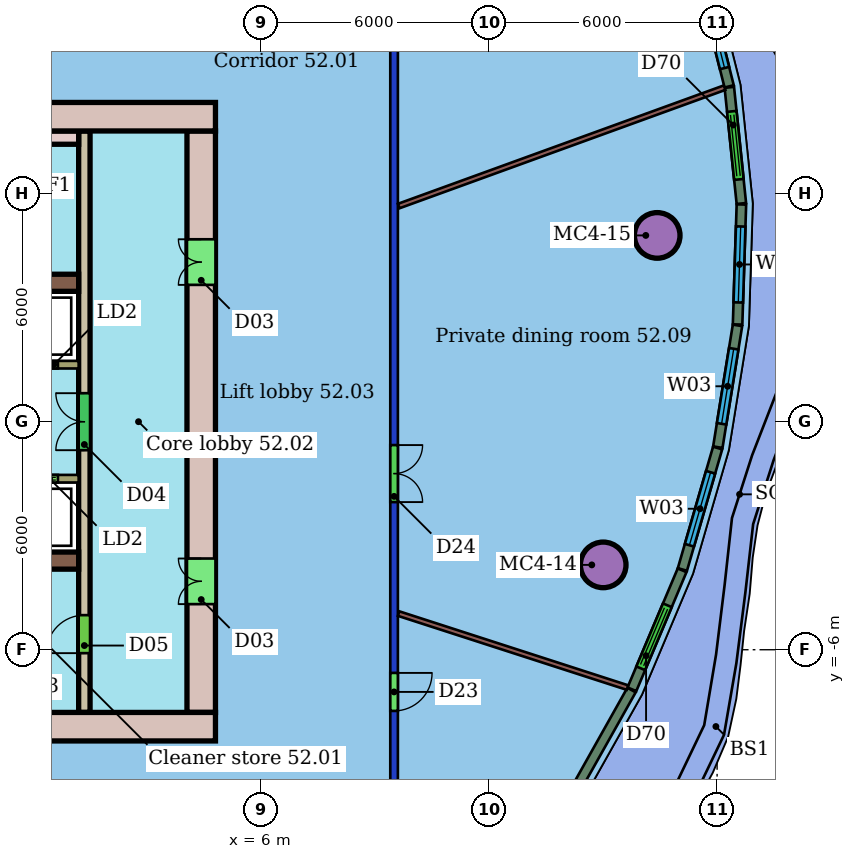
"""IFC4 building model, lengths in metres.
Left out: names, types, materials, properties, quantities, classifications, styles, units other than length and angle.
Written with IfcOpenShell. Run it as: python <this file> out.ifc"""

import sys

from ifc_helpers import new_model, si_unit, direction, frame, frame_2d, origin, origin_2d, place, context, subcontext, project, spatial, rectangle, hollow_circle, extrude, element, fill, save


model = new_model("IFC4")
c1 = context("Model", 3, precision=1e-05, world=origin(), true_north=direction((0.0, 1.0)))
c2 = subcontext(c1, "Body", "Model", "MODEL_VIEW")
j1 = project(units=[si_unit("LENGTHUNIT", "METRE"), si_unit("PLANEANGLEUNIT", "RADIAN")], contexts=[c1])
p1 = place(None, origin())
s1 = spatial("IfcSite", under=j1, at=p1, CompositionType="ELEMENT")
p2 = place(p1, origin())
s2 = spatial("IfcBuilding", under=s1, at=p2, CompositionType="ELEMENT")
p3 = place(p2, frame((0.0, 0.0, 213.7)))
s3 = spatial("IfcBuildingStorey", under=s2, at=p3, CompositionType="ELEMENT", Elevation=213.7)
for number, where, z_axis, x_axis in (
    (1, (15.003, -3.768, 0.0), (0.0, 0.0, 1.0), (1.0, 0.0, 0.0)),
    (2, (16.424, 4.901, 0.0), (0.0, 0.0, 1.0), (1.0, 0.0, 0.0)),
):
    element("IfcColumn", number, at=place(p3, frame(where, z_axis=z_axis, x_axis=x_axis)), inside=s3, PredefinedType="COLUMN", context=c2, shape_type="SweptSolid", body=[
        extrude(hollow_circle(Radius=0.6, WallThickness=0.045, at=origin_2d()), origin(), (0.0, 0.0, 1.0), 3.45),
    ])
p4 = place(p3, frame((9.5, 10.4, 0.0), z_axis=(0.0, 0.0, 1.0), x_axis=(0.0, -1.0, 0.0)))
e3 = element("IfcWall", 3, at=p4, inside=s3, PredefinedType="PARTITIONING", context=c2, shape_type="SweptSolid", body=[
    extrude(rectangle(XDim=20.8, YDim=0.2, at=frame_2d((10.4, 0.0))), origin(), (0.0, 0.0, 1.0), 3.05),
])
p5 = place(p4, frame((17.01, 0.0, 0.0)))
e4 = element("IfcOpeningElement", 4, at=p5, cuts=e3, PredefinedType="OPENING", context=c2, shape_type="SweptSolid", body=[
    extrude(rectangle(XDim=1.0, YDim=2.4, at=frame_2d((0.5, 1.2))), frame((0.0, 0.11, 0.0), z_axis=(0.0, -1.0, 0.0), x_axis=(1.0, 0.0, 0.0)), (0.0, 0.0, 1.0), 0.22),
])
p6 = place(p4, frame((11.015, 0.0, 0.0)))
e5 = element("IfcOpeningElement", 5, at=p6, cuts=e3, PredefinedType="OPENING", context=c2, shape_type="SweptSolid", body=[
    extrude(rectangle(XDim=1.5, YDim=2.1, at=frame_2d((0.75, 1.05))), frame((0.0, 0.11, 0.0), z_axis=(0.0, -1.0, 0.0), x_axis=(1.0, 0.0, 0.0)), (0.0, 0.0, 1.0), 0.22),
])
p7 = place(p3, frame((15.642, -6.996, 0.0), z_axis=(0.0, 0.0, 1.0), x_axis=(-0.951521574536, 0.307582010514, 0.0)))
e6 = element("IfcWall", 6, at=p7, inside=s3, PredefinedType="PARTITIONING", context=c2, shape_type="SweptSolid", body=[
    extrude(rectangle(XDim=6.329, YDim=0.125, at=frame_2d((3.165, 0.0))), origin(), (0.0, 0.0, 1.0), 3.45),
])
p8 = place(p3, frame((18.197, 8.789, 0.0), z_axis=(0.0, 0.0, 1.0), x_axis=(-0.939914460754, -0.341410026896, 0.0)))
e7 = element("IfcWall", 7, at=p8, inside=s3, PredefinedType="PARTITIONING", context=c2, shape_type="SweptSolid", body=[
    extrude(rectangle(XDim=9.124, YDim=0.125, at=frame_2d((4.562, 0.0))), origin(), (0.0, 0.0, 1.0), 3.45),
])
p9 = place(p3, frame((14.077, -10.035, 0.0), z_axis=(0.0, 0.0, 1.0), x_axis=(0.489914644591, 0.871770406136, 0.0)))
e8 = element("IfcWall", 8, at=p9, inside=s3, PredefinedType="SOLIDWALL", context=c2, shape_type="SweptSolid", body=[
    extrude(rectangle(XDim=3.412, YDim=0.25, at=frame_2d((1.706, 0.0))), origin(), (0.0, 0.0, 1.0), 3.1),
])
p10 = place(p3, frame((15.758, -7.041, 0.0), z_axis=(0.0, 0.0, 1.0), x_axis=(0.388763390527, 0.921337628769, 0.0)))
e9 = element("IfcWall", 9, at=p10, inside=s3, PredefinedType="SOLIDWALL", context=c2, shape_type="SweptSolid", body=[
    extrude(rectangle(XDim=3.399, YDim=0.25, at=frame_2d((1.699, 0.0))), origin(), (0.0, 0.0, 1.0), 3.1),
])
p11 = place(p10, frame((0.599, 0.0, 0.0)))
e10 = element("IfcOpeningElement", 10, at=p11, cuts=e9, PredefinedType="OPENING", context=c2, shape_type="SweptSolid", body=[
    extrude(rectangle(XDim=1.8, YDim=2.4, at=frame_2d((0.9, 1.2))), frame((0.0, 0.135, 0.0), z_axis=(0.0, -1.0, 0.0), x_axis=(1.0, 0.0, 0.0)), (0.0, 0.0, 1.0), 0.27),
])
p12 = place(p3, frame((17.087, -3.888, 0.0), z_axis=(0.0, 0.0, 1.0), x_axis=(0.278604991916, 0.960405778033, 0.0)))
e11 = element("IfcWall", 11, at=p12, inside=s3, PredefinedType="SOLIDWALL", context=c2, shape_type="SweptSolid", body=[
    extrude(rectangle(XDim=3.327, YDim=0.25, at=frame_2d((1.664, 0.0))), origin(), (0.0, 0.0, 1.0), 3.1),
])
p13 = place(p12, frame((0.664, 0.0, 0.9)))
e12 = element("IfcOpeningElement", 12, at=p13, cuts=e11, PredefinedType="OPENING", context=c2, shape_type="SweptSolid", body=[
    extrude(rectangle(XDim=2.0, YDim=2.1, at=frame_2d((1.0, 1.05))), frame((0.0, 0.135, 0.0), z_axis=(0.0, -1.0, 0.0), x_axis=(1.0, 0.0, 0.0)), (0.0, 0.0, 1.0), 0.27),
])
p14 = place(p3, frame((18.019, -0.67, 0.0), z_axis=(0.0, 0.0, 1.0), x_axis=(0.159457089841, 0.987204860452, 0.0)))
e13 = element("IfcWall", 13, at=p14, inside=s3, PredefinedType="SOLIDWALL", context=c2, shape_type="SweptSolid", body=[
    extrude(rectangle(XDim=3.246, YDim=0.25, at=frame_2d((1.623, 0.0))), origin(), (0.0, 0.0, 1.0), 3.1),
])
p15 = place(p14, frame((0.623, 0.0, 0.9)))
e14 = element("IfcOpeningElement", 14, at=p15, cuts=e13, PredefinedType="OPENING", context=c2, shape_type="SweptSolid", body=[
    extrude(rectangle(XDim=2.0, YDim=2.1, at=frame_2d((1.0, 1.05))), frame((0.0, 0.135, 0.0), z_axis=(0.0, -1.0, 0.0), x_axis=(1.0, 0.0, 0.0)), (0.0, 0.0, 1.0), 0.27),
])
p16 = place(p3, frame((18.539, 2.558, 0.0), z_axis=(0.0, 0.0, 1.0), x_axis=(0.031760681262, 0.999495502304, 0.0)))
e15 = element("IfcWall", 15, at=p16, inside=s3, PredefinedType="SOLIDWALL", context=c2, shape_type="SweptSolid", body=[
    extrude(rectangle(XDim=3.159, YDim=0.25, at=frame_2d((1.58, 0.0))), origin(), (0.0, 0.0, 1.0), 3.1),
])
p17 = place(p16, frame((0.58, 0.0, 0.9)))
e16 = element("IfcOpeningElement", 16, at=p17, cuts=e15, PredefinedType="OPENING", context=c2, shape_type="SweptSolid", body=[
    extrude(rectangle(XDim=2.0, YDim=2.1, at=frame_2d((1.0, 1.05))), frame((0.0, 0.135, 0.0), z_axis=(0.0, -1.0, 0.0), x_axis=(1.0, 0.0, 0.0)), (0.0, 0.0, 1.0), 0.27),
])
p18 = place(p3, frame((18.639, 5.741, 0.0), z_axis=(0.0, 0.0, 1.0), x_axis=(-0.10327045025, 0.994653313524, 0.0)))
e17 = element("IfcWall", 17, at=p18, inside=s3, PredefinedType="SOLIDWALL", context=c2, shape_type="SweptSolid", body=[
    extrude(rectangle(XDim=3.073, YDim=0.25, at=frame_2d((1.537, 0.0))), origin(), (0.0, 0.0, 1.0), 3.1),
])
p19 = place(p18, frame((0.637, 0.0, 0.0)))
e18 = element("IfcOpeningElement", 18, at=p19, cuts=e17, PredefinedType="OPENING", context=c2, shape_type="SweptSolid", body=[
    extrude(rectangle(XDim=1.8, YDim=2.4, at=frame_2d((0.9, 1.2))), frame((0.0, 0.135, 0.0), z_axis=(0.0, -1.0, 0.0), x_axis=(1.0, 0.0, 0.0)), (0.0, 0.0, 1.0), 0.27),
])
p20 = place(p3, frame((18.317, 8.823, 0.0), z_axis=(0.0, 0.0, 1.0), x_axis=(-0.243245471753, 0.96996476249, 0.0)))
e19 = element("IfcWall", 19, at=p20, inside=s3, PredefinedType="SOLIDWALL", context=c2, shape_type="SweptSolid", body=[
    extrude(rectangle(XDim=2.994, YDim=0.25, at=frame_2d((1.497, 0.0))), origin(), (0.0, 0.0, 1.0), 3.1),
])
p21 = place(p20, frame((0.497, 0.0, 0.9)))
e20 = element("IfcOpeningElement", 20, at=p21, cuts=e19, PredefinedType="OPENING", context=c2, shape_type="SweptSolid", body=[
    extrude(rectangle(XDim=2.0, YDim=2.1, at=frame_2d((1.0, 1.05))), frame((0.0, 0.135, 0.0), z_axis=(0.0, -1.0, 0.0), x_axis=(1.0, 0.0, 0.0)), (0.0, 0.0, 1.0), 0.27),
])
p22 = place(p3, frame((4.8, 8.025, 0.0), z_axis=(0.0, 0.0, 1.0), x_axis=(-1.0, 0.0, 0.0)))
e21 = element("IfcWall", 21, at=p22, inside=s3, PredefinedType="SHEAR", context=c2, shape_type="SweptSolid", body=[
    extrude(rectangle(XDim=10.8, YDim=0.75, at=frame_2d((5.4, 0.0))), origin(), (0.0, 0.0, 1.0), 3.3),
])
p23 = place(p22, frame((4.4, 0.0, 0.0)))
e22 = element("IfcOpeningElement", 22, at=p23, cuts=e21, PredefinedType="OPENING", context=c2, shape_type="SweptSolid", body=[
    extrude(rectangle(XDim=1.2, YDim=2.1, at=frame_2d((0.6, 1.05))), frame((0.0, 0.385, 0.0), z_axis=(0.0, -1.0, 0.0), x_axis=(1.0, 0.0, 0.0)), (0.0, 0.0, 1.0), 0.77),
])
p24 = place(p3, frame((-16.8, -8.025, 0.0), z_axis=(0.0, 0.0, 1.0), x_axis=(1.0, 0.0, 0.0)))
e23 = element("IfcWall", 23, at=p24, inside=s3, PredefinedType="SHEAR", context=c2, shape_type="SweptSolid", body=[
    extrude(rectangle(XDim=21.6, YDim=0.75, at=frame_2d((10.8, 0.0))), origin(), (0.0, 0.0, 1.0), 3.3),
])
p25 = place(p24, frame((4.8, 0.0, 0.0)))
e24 = element("IfcOpeningElement", 24, at=p25, cuts=e23, PredefinedType="OPENING", context=c2, shape_type="SweptSolid", body=[
    extrude(rectangle(XDim=1.2, YDim=2.1, at=frame_2d((0.6, 1.05))), frame((0.0, 0.385, 0.0), z_axis=(0.0, -1.0, 0.0), x_axis=(1.0, 0.0, 0.0)), (0.0, 0.0, 1.0), 0.77),
])
p26 = place(p3, frame((4.425, -7.65, 0.0), z_axis=(0.0, 0.0, 1.0), x_axis=(0.0, 1.0, 0.0)))
e25 = element("IfcWall", 25, at=p26, inside=s3, PredefinedType="SHEAR", context=c2, shape_type="SweptSolid", body=[
    extrude(rectangle(XDim=15.3, YDim=0.75, at=frame_2d((7.65, 0.0))), origin(), (0.0, 0.0, 1.0), 3.3),
])
p27 = place(p26, frame((2.85, 0.0, 0.0)))
e26 = element("IfcOpeningElement", 26, at=p27, cuts=e25, PredefinedType="OPENING", context=c2, shape_type="SweptSolid", body=[
    extrude(rectangle(XDim=1.2, YDim=2.1, at=frame_2d((0.6, 1.05))), frame((0.0, 0.385, 0.0), z_axis=(0.0, -1.0, 0.0), x_axis=(1.0, 0.0, 0.0)), (0.0, 0.0, 1.0), 0.77),
])
p28 = place(p26, frame((11.25, 0.0, 0.0)))
e27 = element("IfcOpeningElement", 27, at=p28, cuts=e25, PredefinedType="OPENING", context=c2, shape_type="SweptSolid", body=[
    extrude(rectangle(XDim=1.2, YDim=2.1, at=frame_2d((0.6, 1.05))), frame((0.0, 0.385, 0.0), z_axis=(0.0, -1.0, 0.0), x_axis=(1.0, 0.0, 0.0)), (0.0, 0.0, 1.0), 0.77),
])
for number, where, z_axis, x_axis in (
    (28, (-6.0, 3.655, 0.0), (0.0, 0.0, 1.0), (1.0, 0.0, 0.0)),
    (29, (-6.0, -3.655, 0.0), (0.0, 0.0, 1.0), (1.0, 0.0, 0.0)),
):
    element("IfcWall", number, at=place(p3, frame(where, z_axis=z_axis, x_axis=x_axis)), inside=s3, PredefinedType="SHEAR", context=c2, shape_type="SweptSolid", body=[
        extrude(rectangle(XDim=7.2, YDim=0.45, at=frame_2d((3.6, 0.0))), origin(), (0.0, 0.0, 1.0), 3.3),
    ])
p29 = place(p3, frame((1.35, -7.65, 0.0), z_axis=(0.0, 0.0, 1.0), x_axis=(0.0, 1.0, 0.0)))
e30 = element("IfcWall", 30, at=p29, inside=s3, PredefinedType="SHEAR", context=c2, shape_type="SweptSolid", body=[
    extrude(rectangle(XDim=15.3, YDim=0.3, at=frame_2d((7.65, 0.0))), origin(), (0.0, 0.0, 1.0), 3.3),
])
p30 = place(p29, frame((1.56, 0.0, 0.0)))
e31 = element("IfcOpeningElement", 31, at=p30, cuts=e30, PredefinedType="OPENING", context=c2, shape_type="SweptSolid", body=[
    extrude(rectangle(XDim=1.0, YDim=2.1, at=frame_2d((0.5, 1.05))), frame((0.0, 0.16, 0.0), z_axis=(0.0, -1.0, 0.0), x_axis=(1.0, 0.0, 0.0)), (0.0, 0.0, 1.0), 0.32),
])
p31 = place(p29, frame((6.9, 0.0, 0.0)))
e32 = element("IfcOpeningElement", 32, at=p31, cuts=e30, PredefinedType="OPENING", context=c2, shape_type="SweptSolid", body=[
    extrude(rectangle(XDim=1.5, YDim=2.1, at=frame_2d((0.75, 1.05))), frame((0.0, 0.16, 0.0), z_axis=(0.0, -1.0, 0.0), x_axis=(1.0, 0.0, 0.0)), (0.0, 0.0, 1.0), 0.32),
])
p32 = place(p3, frame((-13.2, 1.5, 0.0), z_axis=(0.0, 0.0, 1.0), x_axis=(1.0, 0.0, 0.0)))
e33 = element("IfcWall", 33, at=p32, inside=s3, PredefinedType="SHEAR", context=c2, shape_type="SweptSolid", body=[
    extrude(rectangle(XDim=14.4, YDim=0.2, at=frame_2d((7.2, 0.0))), origin(), (0.0, 0.0, 1.0), 3.3),
])
p33 = place(p32, frame((10.312, 0.0, 0.0)))
e34 = element("IfcOpeningElement", 34, at=p33, cuts=e33, PredefinedType="OPENING", context=c2, shape_type="SweptSolid", body=[
    extrude(rectangle(XDim=1.1, YDim=2.1, at=frame_2d((0.55, 1.05))), frame((0.0, 0.11, 0.0), z_axis=(0.0, -1.0, 0.0), x_axis=(1.0, 0.0, 0.0)), (0.0, 0.0, 1.0), 0.22),
])
p34 = place(p32, frame((12.754, 0.0, 0.0)))
e35 = element("IfcOpeningElement", 35, at=p34, cuts=e33, PredefinedType="OPENING", context=c2, shape_type="SweptSolid", body=[
    extrude(rectangle(XDim=1.1, YDim=2.1, at=frame_2d((0.55, 1.05))), frame((0.0, 0.11, 0.0), z_axis=(0.0, -1.0, 0.0), x_axis=(1.0, 0.0, 0.0)), (0.0, 0.0, 1.0), 0.22),
])
p35 = place(p32, frame((0.15, 0.0, 0.0)))
e36 = element("IfcOpeningElement", 36, at=p35, cuts=e33, PredefinedType="OPENING", context=c2, shape_type="SweptSolid", body=[
    extrude(rectangle(XDim=1.0, YDim=2.1, at=frame_2d((0.5, 1.05))), frame((0.0, 0.11, 0.0), z_axis=(0.0, -1.0, 0.0), x_axis=(1.0, 0.0, 0.0)), (0.0, 0.0, 1.0), 0.22),
])
p36 = place(p32, frame((2.794, 0.0, 0.0)))
e37 = element("IfcOpeningElement", 37, at=p36, cuts=e33, PredefinedType="OPENING", context=c2, shape_type="SweptSolid", body=[
    extrude(rectangle(XDim=0.9, YDim=2.1, at=frame_2d((0.45, 1.05))), frame((0.0, 0.11, 0.0), z_axis=(0.0, -1.0, 0.0), x_axis=(1.0, 0.0, 0.0)), (0.0, 0.0, 1.0), 0.22),
])
p37 = place(p32, frame((8.467, 0.0, 0.0)))
e38 = element("IfcOpeningElement", 38, at=p37, cuts=e33, PredefinedType="OPENING", context=c2, shape_type="SweptSolid", body=[
    extrude(rectangle(XDim=0.9, YDim=2.1, at=frame_2d((0.45, 1.05))), frame((0.0, 0.11, 0.0), z_axis=(0.0, -1.0, 0.0), x_axis=(1.0, 0.0, 0.0)), (0.0, 0.0, 1.0), 0.22),
])
p38 = place(p3, frame((1.2, -1.5, 0.0), z_axis=(0.0, 0.0, 1.0), x_axis=(-1.0, 0.0, 0.0)))
e39 = element("IfcWall", 39, at=p38, inside=s3, PredefinedType="SHEAR", context=c2, shape_type="SweptSolid", body=[
    extrude(rectangle(XDim=14.4, YDim=0.2, at=frame_2d((7.2, 0.0))), origin(), (0.0, 0.0, 1.0), 3.3),
])
p39 = place(p38, frame((7.821, 0.0, 0.0)))
e40 = element("IfcOpeningElement", 40, at=p39, cuts=e39, PredefinedType="OPENING", context=c2, shape_type="SweptSolid", body=[
    extrude(rectangle(XDim=1.2, YDim=2.1, at=frame_2d((0.6, 1.05))), frame((0.0, 0.11, 0.0), z_axis=(0.0, -1.0, 0.0), x_axis=(1.0, 0.0, 0.0)), (0.0, 0.0, 1.0), 0.22),
])
p40 = place(p38, frame((0.546, 0.0, 0.0)))
e41 = element("IfcOpeningElement", 41, at=p40, cuts=e39, PredefinedType="OPENING", context=c2, shape_type="SweptSolid", body=[
    extrude(rectangle(XDim=1.1, YDim=2.1, at=frame_2d((0.55, 1.05))), frame((0.0, 0.11, 0.0), z_axis=(0.0, -1.0, 0.0), x_axis=(1.0, 0.0, 0.0)), (0.0, 0.0, 1.0), 0.22),
])
p41 = place(p38, frame((4.983, 0.0, 0.0)))
e42 = element("IfcOpeningElement", 42, at=p41, cuts=e39, PredefinedType="OPENING", context=c2, shape_type="SweptSolid", body=[
    extrude(rectangle(XDim=1.0, YDim=2.1, at=frame_2d((0.5, 1.05))), frame((0.0, 0.11, 0.0), z_axis=(0.0, -1.0, 0.0), x_axis=(1.0, 0.0, 0.0)), (0.0, 0.0, 1.0), 0.22),
])
p42 = place(p38, frame((2.592, 0.0, 0.0)))
e43 = element("IfcOpeningElement", 43, at=p42, cuts=e39, PredefinedType="OPENING", context=c2, shape_type="SweptSolid", body=[
    extrude(rectangle(XDim=1.0, YDim=2.1, at=frame_2d((0.5, 1.05))), frame((0.0, 0.11, 0.0), z_axis=(0.0, -1.0, 0.0), x_axis=(1.0, 0.0, 0.0)), (0.0, 0.0, 1.0), 0.22),
])
p43 = place(p3, frame((0.4, 7.475, 0.0), z_axis=(0.0, 0.0, 1.0), x_axis=(1.0, 0.0, 0.0)))
e44 = element("IfcWall", 44, at=p43, inside=s3, PredefinedType="SHEAR", context=c2, shape_type="SweptSolid", body=[
    extrude(rectangle(XDim=0.8, YDim=0.35, at=frame_2d((0.4, 0.0))), origin(), (0.0, 0.0, 1.0), 3.3),
])
p44 = place(p5, origin())
e45 = element("IfcDoor", 45, at=p44, inside=s3, OperationType="SINGLE_SWING_LEFT", PredefinedType="DOOR", context=c2, shape_type="SweptSolid", body=[
    extrude(rectangle(XDim=1.0, YDim=2.4, at=frame_2d((0.5, 1.2))), frame((0.0, 0.025, 0.0), z_axis=(0.0, -1.0, 0.0), x_axis=(1.0, 0.0, 0.0)), (0.0, 0.0, 1.0), 0.05),
])
fill(e4, e45)
p45 = place(p6, origin())
e46 = element("IfcDoor", 46, at=p45, inside=s3, OperationType="DOUBLE_DOOR_SINGLE_SWING", PredefinedType="DOOR", context=c2, shape_type="SweptSolid", body=[
    extrude(rectangle(XDim=1.5, YDim=2.1, at=frame_2d((0.75, 1.05))), frame((0.0, 0.025, 0.0), z_axis=(0.0, -1.0, 0.0), x_axis=(1.0, 0.0, 0.0)), (0.0, 0.0, 1.0), 0.05),
])
fill(e5, e46)
p46 = place(p11, origin())
e47 = element("IfcDoor", 47, at=p46, inside=s3, OperationType="DOUBLE_DOOR_SLIDING", PredefinedType="DOOR", context=c2, shape_type="SweptSolid", body=[
    extrude(rectangle(XDim=1.8, YDim=2.4, at=frame_2d((0.9, 1.2))), frame((0.0, 0.025, 0.0), z_axis=(0.0, -1.0, 0.0), x_axis=(1.0, 0.0, 0.0)), (0.0, 0.0, 1.0), 0.05),
])
fill(e10, e47)
p47 = place(p13, origin())
e48 = element("IfcWindow", 48, at=p47, inside=s3, PartitioningType="SINGLE_PANEL", PredefinedType="WINDOW", context=c2, shape_type="SweptSolid", body=[
    extrude(rectangle(XDim=2.0, YDim=2.1, at=frame_2d((1.0, 1.05))), frame((0.0, 0.03, 0.0), z_axis=(0.0, -1.0, 0.0), x_axis=(1.0, 0.0, 0.0)), (0.0, 0.0, 1.0), 0.06),
])
fill(e12, e48)
p48 = place(p15, origin())
e49 = element("IfcWindow", 49, at=p48, inside=s3, PartitioningType="SINGLE_PANEL", PredefinedType="WINDOW", context=c2, shape_type="SweptSolid", body=[
    extrude(rectangle(XDim=2.0, YDim=2.1, at=frame_2d((1.0, 1.05))), frame((0.0, 0.03, 0.0), z_axis=(0.0, -1.0, 0.0), x_axis=(1.0, 0.0, 0.0)), (0.0, 0.0, 1.0), 0.06),
])
fill(e14, e49)
p49 = place(p17, origin())
e50 = element("IfcWindow", 50, at=p49, inside=s3, PartitioningType="SINGLE_PANEL", PredefinedType="WINDOW", context=c2, shape_type="SweptSolid", body=[
    extrude(rectangle(XDim=2.0, YDim=2.1, at=frame_2d((1.0, 1.05))), frame((0.0, 0.03, 0.0), z_axis=(0.0, -1.0, 0.0), x_axis=(1.0, 0.0, 0.0)), (0.0, 0.0, 1.0), 0.06),
])
fill(e16, e50)
p50 = place(p19, origin())
e51 = element("IfcDoor", 51, at=p50, inside=s3, OperationType="DOUBLE_DOOR_SLIDING", PredefinedType="DOOR", context=c2, shape_type="SweptSolid", body=[
    extrude(rectangle(XDim=1.8, YDim=2.4, at=frame_2d((0.9, 1.2))), frame((0.0, 0.025, 0.0), z_axis=(0.0, -1.0, 0.0), x_axis=(1.0, 0.0, 0.0)), (0.0, 0.0, 1.0), 0.05),
])
fill(e18, e51)
p51 = place(p21, origin())
e52 = element("IfcWindow", 52, at=p51, inside=s3, PartitioningType="SINGLE_PANEL", PredefinedType="WINDOW", context=c2, shape_type="SweptSolid", body=[
    extrude(rectangle(XDim=2.0, YDim=2.1, at=frame_2d((1.0, 1.05))), frame((0.0, 0.03, 0.0), z_axis=(0.0, -1.0, 0.0), x_axis=(1.0, 0.0, 0.0)), (0.0, 0.0, 1.0), 0.06),
])
fill(e20, e52)
p52 = place(p27, origin())
e53 = element("IfcDoor", 53, at=p52, inside=s3, OperationType="DOUBLE_DOOR_SINGLE_SWING", PredefinedType="NOTDEFINED", context=c2, shape_type="SweptSolid", body=[
    extrude(rectangle(XDim=1.2, YDim=2.1, at=frame_2d((0.6, 1.05))), frame((0.0, 0.025, 0.0), z_axis=(0.0, -1.0, 0.0), x_axis=(1.0, 0.0, 0.0)), (0.0, 0.0, 1.0), 0.05),
])
fill(e26, e53)
p53 = place(p28, origin())
e54 = element("IfcDoor", 54, at=p53, inside=s3, OperationType="DOUBLE_DOOR_SINGLE_SWING", PredefinedType="NOTDEFINED", context=c2, shape_type="SweptSolid", body=[
    extrude(rectangle(XDim=1.2, YDim=2.1, at=frame_2d((0.6, 1.05))), frame((0.0, 0.025, 0.0), z_axis=(0.0, -1.0, 0.0), x_axis=(1.0, 0.0, 0.0)), (0.0, 0.0, 1.0), 0.05),
])
fill(e27, e54)
p54 = place(p30, origin())
e55 = element("IfcDoor", 55, at=p54, inside=s3, OperationType="SINGLE_SWING_LEFT", PredefinedType="NOTDEFINED", context=c2, shape_type="SweptSolid", body=[
    extrude(rectangle(XDim=1.0, YDim=2.1, at=frame_2d((0.5, 1.05))), frame((0.0, 0.025, 0.0), z_axis=(0.0, -1.0, 0.0), x_axis=(1.0, 0.0, 0.0)), (0.0, 0.0, 1.0), 0.05),
])
fill(e31, e55)
p55 = place(p31, origin())
e56 = element("IfcDoor", 56, at=p55, inside=s3, OperationType="DOUBLE_DOOR_SINGLE_SWING", PredefinedType="NOTDEFINED", context=c2, shape_type="SweptSolid", body=[
    extrude(rectangle(XDim=1.5, YDim=2.1, at=frame_2d((0.75, 1.05))), frame((0.0, 0.025, 0.0), z_axis=(0.0, -1.0, 0.0), x_axis=(1.0, 0.0, 0.0)), (0.0, 0.0, 1.0), 0.05),
])
fill(e32, e56)
p56 = place(p34, origin())
e57 = element("IfcDoor", 57, at=p56, inside=s3, OperationType="DOUBLE_DOOR_SLIDING", PredefinedType="NOTDEFINED", context=c2, shape_type="SweptSolid", body=[
    extrude(rectangle(XDim=1.1, YDim=2.1, at=frame_2d((0.55, 1.05))), frame((0.0, 0.025, 0.0), z_axis=(0.0, -1.0, 0.0), x_axis=(1.0, 0.0, 0.0)), (0.0, 0.0, 1.0), 0.05),
])
fill(e35, e57)
p57 = place(p40, origin())
e58 = element("IfcDoor", 58, at=p57, inside=s3, OperationType="DOUBLE_DOOR_SLIDING", PredefinedType="NOTDEFINED", context=c2, shape_type="SweptSolid", body=[
    extrude(rectangle(XDim=1.1, YDim=2.1, at=frame_2d((0.55, 1.05))), frame((0.0, 0.025, 0.0), z_axis=(0.0, -1.0, 0.0), x_axis=(1.0, 0.0, 0.0)), (0.0, 0.0, 1.0), 0.05),
])
fill(e41, e58)
save(model, sys.argv[1])
